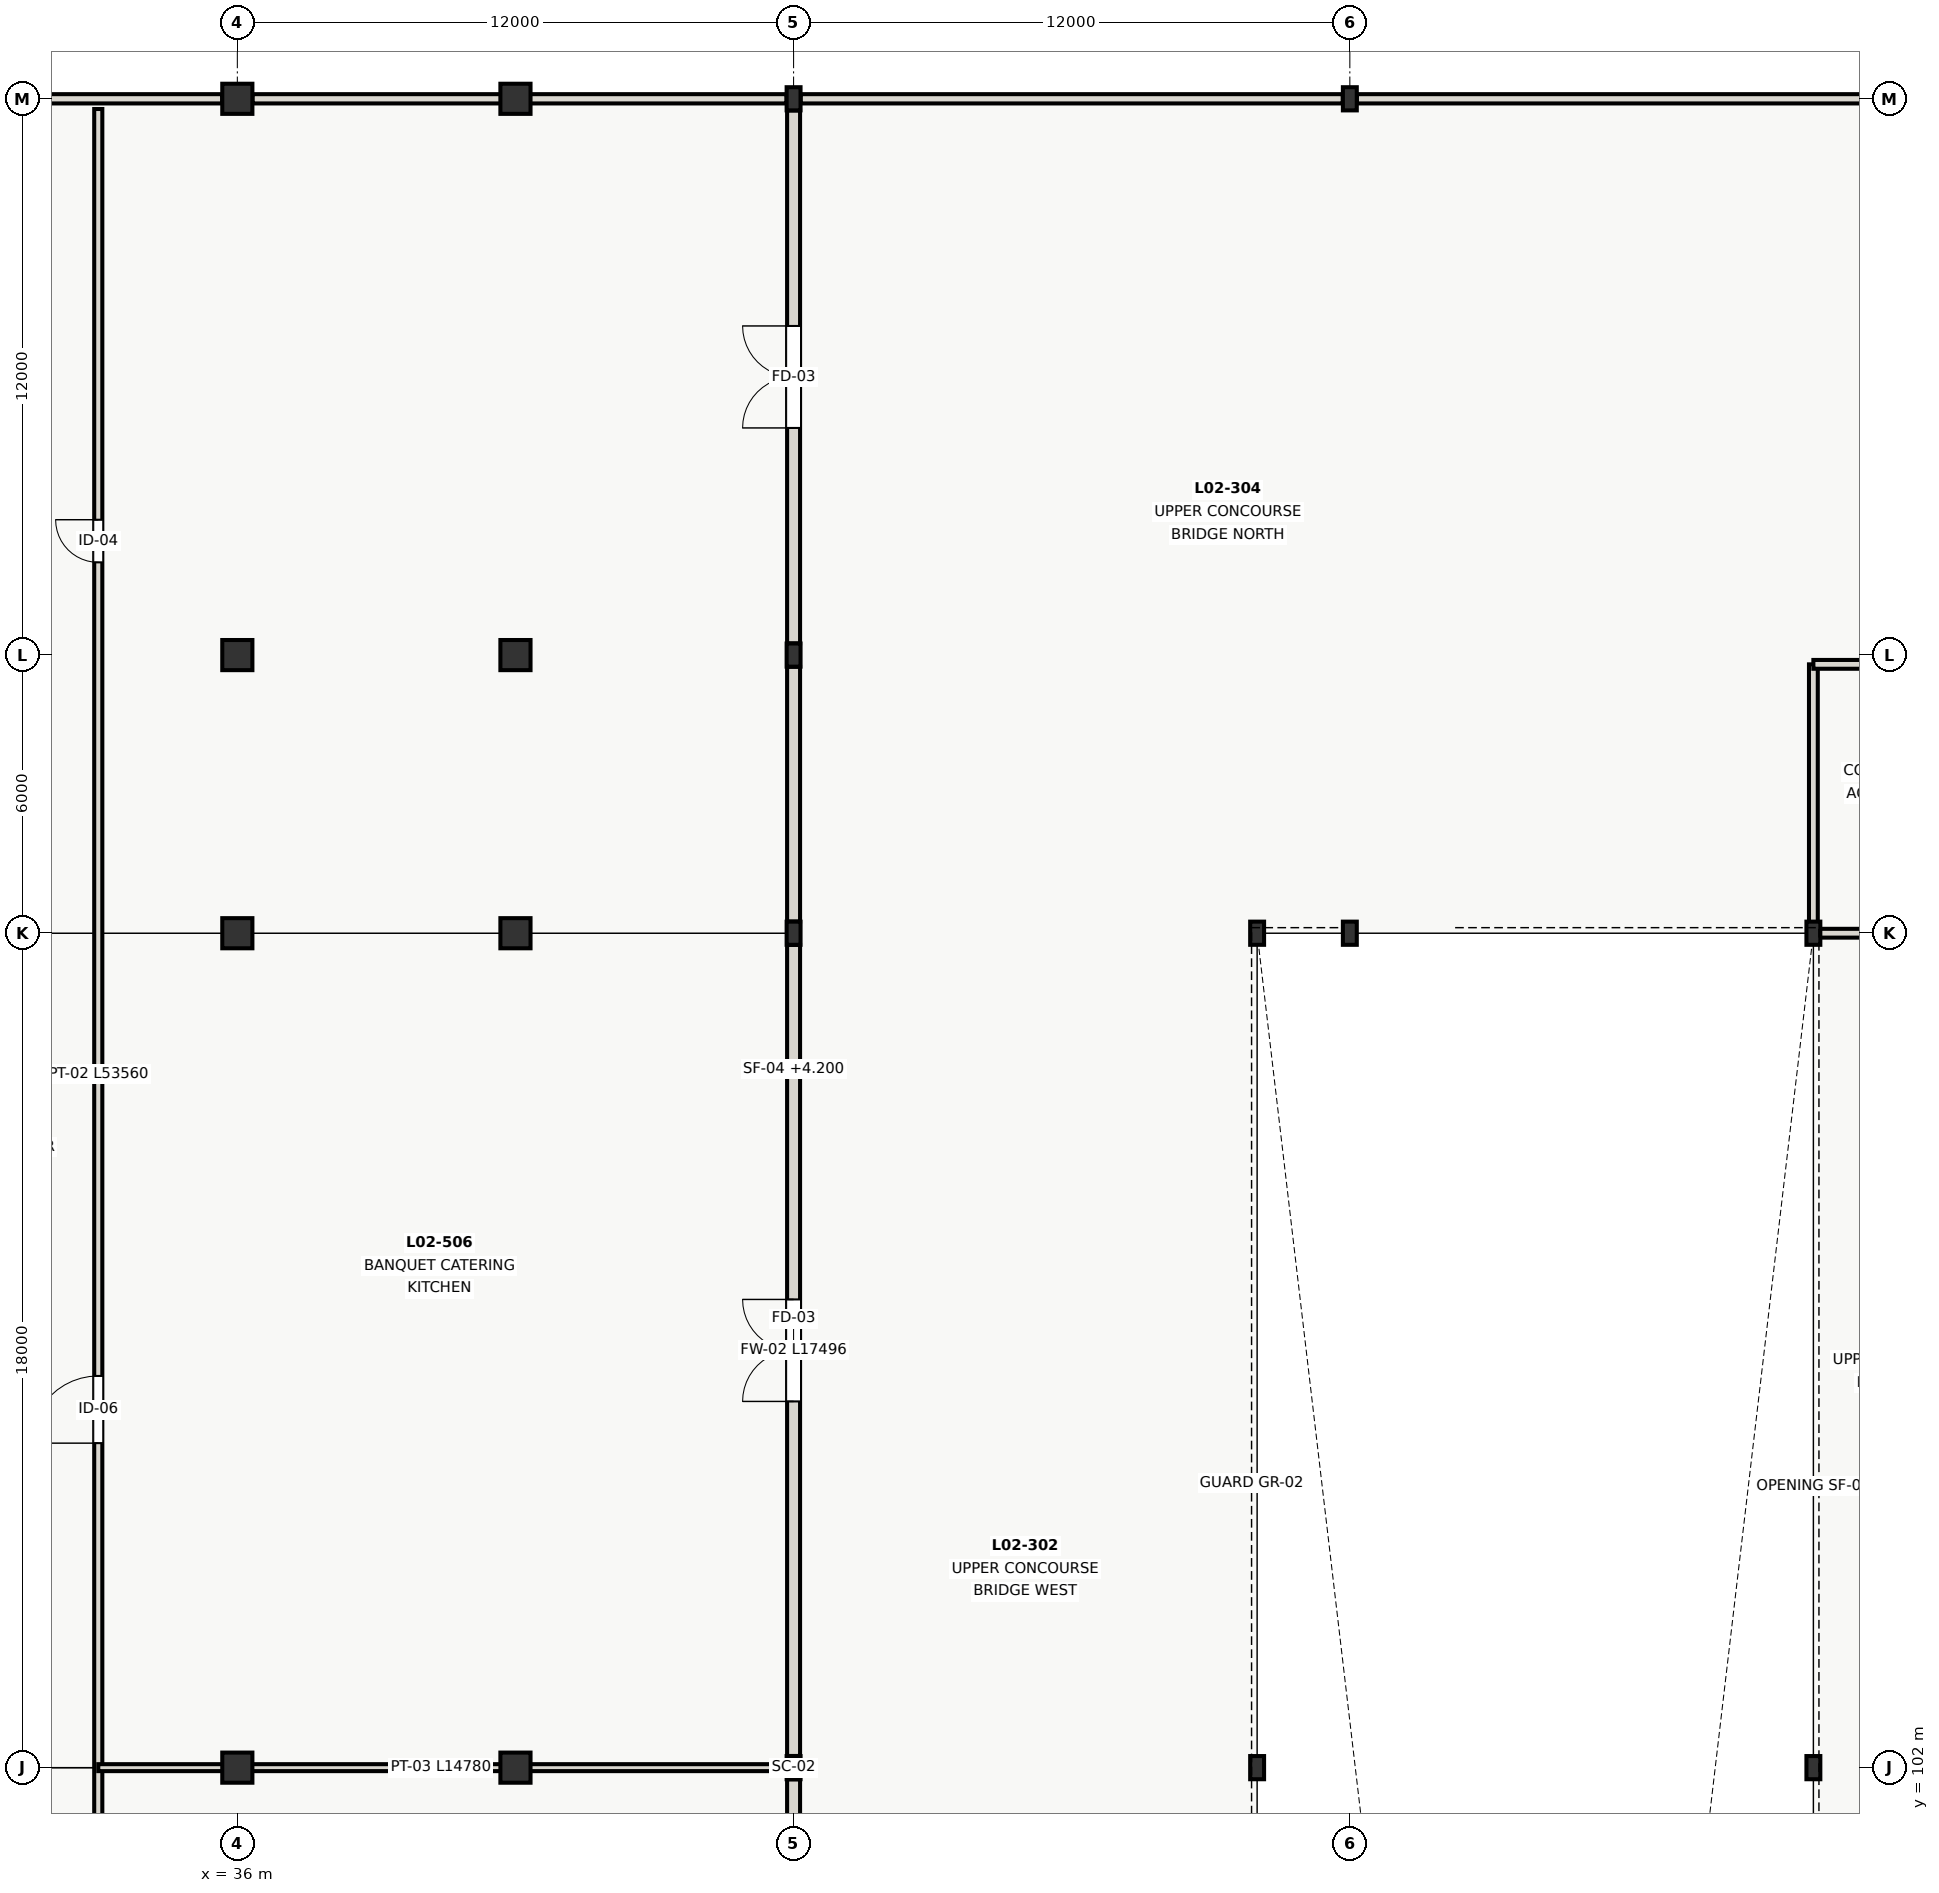
"""IFC4 building model, lengths in metres.
Left out: names, types, materials, properties, quantities, classifications, styles, units other than length and angle.
Written with IfcOpenShell. Run it as: python <this file> out.ifc"""

import sys

from ifc_helpers import new_model, si_unit, direction, frame, frame_2d, origin, origin_2d, place, context, subcontext, project, spatial, rectangle, i_section, extrude, element, fill, save


model = new_model("IFC4")
c1 = context("Model", 3, precision=1e-05, world=origin(), true_north=direction((0.0, 1.0)))
c2 = subcontext(c1, "Body", "Model", "MODEL_VIEW")
j1 = project(units=[si_unit("LENGTHUNIT", "METRE"), si_unit("PLANEANGLEUNIT", "RADIAN")], contexts=[c1])
p1 = place(None, origin())
s1 = spatial("IfcSite", under=j1, at=p1, CompositionType="ELEMENT")
p2 = place(p1, origin())
s2 = spatial("IfcBuilding", under=s1, at=p2, CompositionType="ELEMENT")
p3 = place(p2, frame((0.0, 0.0, 4.2)))
s3 = spatial("IfcBuildingStorey", under=s2, at=p3, CompositionType="ELEMENT", Elevation=4.2)
for number, where, z_axis, x_axis in (
    (1, (36.0, 102.0, 0.0), (0.0, 0.0, 1.0), (1.0, 0.0, 0.0)),
    (2, (42.0, 102.0, 0.0), (0.0, 0.0, 1.0), (1.0, 0.0, 0.0)),
):
    element("IfcColumn", number, at=place(p3, frame(where, z_axis=z_axis, x_axis=x_axis)), inside=s3, PredefinedType="COLUMN", context=c2, shape_type="SweptSolid", body=[
        extrude(rectangle(XDim=0.65, YDim=0.65, at=origin_2d()), origin(), (0.0, 0.0, 1.0), 4.2),
    ])
for number, where, z_axis, x_axis in (
    (3, (48.0, 102.0, 0.0), (0.0, 0.0, 1.0), (1.0, 0.0, 0.0)),
    (4, (58.0, 102.0, 0.0), (0.0, 0.0, 1.0), (1.0, 0.0, 0.0)),
    (5, (70.0, 102.0, 0.0), (0.0, 0.0, 1.0), (1.0, 0.0, 0.0)),
):
    element("IfcColumn", number, at=place(p3, frame(where, z_axis=z_axis, x_axis=x_axis)), inside=s3, PredefinedType="COLUMN", context=c2, shape_type="SweptSolid", body=[
        extrude(i_section(OverallWidth=0.3, OverallDepth=0.5, WebThickness=0.014, FlangeThickness=0.028, at=origin_2d()), origin(), (0.0, 0.0, 1.0), 4.2),
    ])
for number, where, z_axis, x_axis in (
    (6, (36.0, 120.0, 0.0), (0.0, 0.0, 1.0), (1.0, 0.0, 0.0)),
    (7, (42.0, 120.0, 0.0), (0.0, 0.0, 1.0), (1.0, 0.0, 0.0)),
):
    element("IfcColumn", number, at=place(p3, frame(where, z_axis=z_axis, x_axis=x_axis)), inside=s3, PredefinedType="COLUMN", context=c2, shape_type="SweptSolid", body=[
        extrude(rectangle(XDim=0.65, YDim=0.65, at=origin_2d()), origin(), (0.0, 0.0, 1.0), 4.2),
    ])
for number, where, z_axis, x_axis in (
    (8, (48.0, 120.0, 0.0), (0.0, 0.0, 1.0), (1.0, 0.0, 0.0)),
    (9, (58.0, 120.0, 0.0), (0.0, 0.0, 1.0), (1.0, 0.0, 0.0)),
    (10, (60.0, 120.0, 0.0), (0.0, 0.0, 1.0), (1.0, 0.0, 0.0)),
    (11, (70.0, 120.0, 0.0), (0.0, 0.0, 1.0), (1.0, 0.0, 0.0)),
):
    element("IfcColumn", number, at=place(p3, frame(where, z_axis=z_axis, x_axis=x_axis)), inside=s3, PredefinedType="COLUMN", context=c2, shape_type="SweptSolid", body=[
        extrude(i_section(OverallWidth=0.3, OverallDepth=0.5, WebThickness=0.014, FlangeThickness=0.028, at=origin_2d()), origin(), (0.0, 0.0, 1.0), 4.2),
    ])
for number, where, z_axis, x_axis in (
    (12, (36.0, 126.0, 0.0), (0.0, 0.0, 1.0), (1.0, 0.0, 0.0)),
    (13, (42.0, 126.0, 0.0), (0.0, 0.0, 1.0), (1.0, 0.0, 0.0)),
):
    element("IfcColumn", number, at=place(p3, frame(where, z_axis=z_axis, x_axis=x_axis)), inside=s3, PredefinedType="COLUMN", context=c2, shape_type="SweptSolid", body=[
        extrude(rectangle(XDim=0.65, YDim=0.65, at=origin_2d()), origin(), (0.0, 0.0, 1.0), 4.2),
    ])
p4 = place(p3, frame((48.0, 126.0, 0.0), z_axis=(0.0, 0.0, 1.0), x_axis=(1.0, 0.0, 0.0)))
e14 = element("IfcColumn", 14, at=p4, inside=s3, PredefinedType="COLUMN", context=c2, shape_type="SweptSolid", body=[
    extrude(i_section(OverallWidth=0.3, OverallDepth=0.5, WebThickness=0.014, FlangeThickness=0.028, at=origin_2d()), origin(), (0.0, 0.0, 1.0), 4.2),
])
for number, where, z_axis, x_axis in (
    (15, (36.0, 138.0, 0.0), (0.0, 0.0, 1.0), (1.0, 0.0, 0.0)),
    (16, (42.0, 138.0, 0.0), (0.0, 0.0, 1.0), (1.0, 0.0, 0.0)),
):
    element("IfcColumn", number, at=place(p3, frame(where, z_axis=z_axis, x_axis=x_axis)), inside=s3, PredefinedType="COLUMN", context=c2, shape_type="SweptSolid", body=[
        extrude(rectangle(XDim=0.65, YDim=0.65, at=origin_2d()), origin(), (0.0, 0.0, 1.0), 4.2),
    ])
for number, where, z_axis, x_axis in (
    (17, (48.0, 138.0, 0.0), (0.0, 0.0, 1.0), (1.0, 0.0, 0.0)),
    (18, (60.0, 138.0, 0.0), (0.0, 0.0, 1.0), (1.0, 0.0, 0.0)),
):
    element("IfcColumn", number, at=place(p3, frame(where, z_axis=z_axis, x_axis=x_axis)), inside=s3, PredefinedType="COLUMN", context=c2, shape_type="SweptSolid", body=[
        extrude(i_section(OverallWidth=0.3, OverallDepth=0.5, WebThickness=0.014, FlangeThickness=0.028, at=origin_2d()), origin(), (0.0, 0.0, 1.0), 4.2),
    ])
p5 = place(p3, frame((48.0, 84.252, 0.0), z_axis=(0.0, 0.0, 1.0), x_axis=(0.0, 1.0, 0.0)))
e19 = element("IfcWall", 19, at=p5, inside=s3, PredefinedType="SHEAR", context=c2, shape_type="SweptSolid", body=[
    extrude(rectangle(XDim=17.496, YDim=0.28, at=frame_2d((8.748, 0.0))), origin(), (0.0, 0.0, 1.0), 3.8),
])
p6 = place(p5, frame((7.648, 0.0, 0.0)))
e20 = element("IfcOpeningElement", 20, at=p6, cuts=e19, PredefinedType="OPENING", context=c2, shape_type="SweptSolid", body=[
    extrude(rectangle(XDim=2.2, YDim=2.3, at=frame_2d((1.1, 1.15))), frame((0.0, 0.15, 0.0), z_axis=(0.0, -1.0, 0.0), x_axis=(1.0, 0.0, 0.0)), (0.0, 0.0, 1.0), 0.3),
])
p7 = place(p3, frame((48.0, 102.252, 0.0), z_axis=(0.0, 0.0, 1.0), x_axis=(0.0, 1.0, 0.0)))
e21 = element("IfcWall", 21, at=p7, inside=s3, PredefinedType="SHEAR", context=c2, shape_type="SweptSolid", body=[
    extrude(rectangle(XDim=17.496, YDim=0.28, at=frame_2d((8.748, 0.0))), origin(), (0.0, 0.0, 1.0), 3.8),
])
p8 = place(p7, frame((7.648, 0.0, 0.0)))
e22 = element("IfcOpeningElement", 22, at=p8, cuts=e21, PredefinedType="OPENING", context=c2, shape_type="SweptSolid", body=[
    extrude(rectangle(XDim=2.2, YDim=2.3, at=frame_2d((1.1, 1.15))), frame((0.0, 0.15, 0.0), z_axis=(0.0, -1.0, 0.0), x_axis=(1.0, 0.0, 0.0)), (0.0, 0.0, 1.0), 0.3),
])
p9 = place(p3, frame((48.0, 120.252, 0.0), z_axis=(0.0, 0.0, 1.0), x_axis=(0.0, 1.0, 0.0)))
e23 = element("IfcWall", 23, at=p9, inside=s3, PredefinedType="SHEAR", context=c2, shape_type="SweptSolid", body=[
    extrude(rectangle(XDim=5.496, YDim=0.28, at=frame_2d((2.748, 0.0))), origin(), (0.0, 0.0, 1.0), 3.8),
])
p10 = place(p3, frame((48.0, 126.252, 0.0), z_axis=(0.0, 0.0, 1.0), x_axis=(0.0, 1.0, 0.0)))
e24 = element("IfcWall", 24, at=p10, inside=s3, PredefinedType="SHEAR", context=c2, shape_type="SweptSolid", body=[
    extrude(rectangle(XDim=11.496, YDim=0.28, at=frame_2d((5.748, 0.0))), origin(), (0.0, 0.0, 1.0), 3.8),
])
p11 = place(p10, frame((4.648, 0.0, 0.0)))
e25 = element("IfcOpeningElement", 25, at=p11, cuts=e24, PredefinedType="OPENING", context=c2, shape_type="SweptSolid", body=[
    extrude(rectangle(XDim=2.2, YDim=2.3, at=frame_2d((1.1, 1.15))), frame((0.0, 0.15, 0.0), z_axis=(0.0, -1.0, 0.0), x_axis=(1.0, 0.0, 0.0)), (0.0, 0.0, 1.0), 0.3),
])
p12 = place(p3, frame((24.327, 138.0, 0.0), z_axis=(0.0, 0.0, 1.0), x_axis=(1.0, 0.0, 0.0)))
e26 = element("IfcWall", 26, at=p12, inside=s3, PredefinedType="PARTITIONING", context=c2, shape_type="SweptSolid", body=[
    extrude(rectangle(XDim=11.346, YDim=0.2, at=frame_2d((5.673, 0.0))), origin(), (0.0, 0.0, 1.0), 3.56),
])
p13 = place(p3, frame((36.327, 138.0, 0.0), z_axis=(0.0, 0.0, 1.0), x_axis=(1.0, 0.0, 0.0)))
e27 = element("IfcWall", 27, at=p13, inside=s3, PredefinedType="PARTITIONING", context=c2, shape_type="SweptSolid", body=[
    extrude(rectangle(XDim=11.521, YDim=0.2, at=frame_2d((5.76, 0.0))), origin(), (0.0, 0.0, 1.0), 3.56),
])
p14 = place(p3, frame((48.152, 138.0, 0.0), z_axis=(0.0, 0.0, 1.0), x_axis=(1.0, 0.0, 0.0)))
e28 = element("IfcWall", 28, at=p14, inside=s3, PredefinedType="PARTITIONING", context=c2, shape_type="SweptSolid", body=[
    extrude(rectangle(XDim=11.696, YDim=0.2, at=frame_2d((5.848, 0.0))), origin(), (0.0, 0.0, 1.0), 3.56),
])
p15 = place(p3, frame((60.152, 138.0, 0.0), z_axis=(0.0, 0.0, 1.0), x_axis=(1.0, 0.0, 0.0)))
e29 = element("IfcWall", 29, at=p15, inside=s3, PredefinedType="PARTITIONING", context=c2, shape_type="SweptSolid", body=[
    extrude(rectangle(XDim=11.696, YDim=0.2, at=frame_2d((5.848, 0.0))), origin(), (0.0, 0.0, 1.0), 3.59),
])
p16 = place(p3, frame((33.0, 84.22, 0.0), z_axis=(0.0, 0.0, 1.0), x_axis=(0.0, 1.0, 0.0)))
e30 = element("IfcWall", 30, at=p16, inside=s3, PredefinedType="PARTITIONING", context=c2, shape_type="SweptSolid", body=[
    extrude(rectangle(XDim=53.56, YDim=0.175, at=frame_2d((26.78, 0.0))), origin(), (0.0, 0.0, 1.0), 3.72),
])
p17 = place(p16, frame((7.78, 0.0, 0.0)))
e31 = element("IfcOpeningElement", 31, at=p17, cuts=e30, PredefinedType="OPENING", context=c2, shape_type="SweptSolid", body=[
    extrude(rectangle(XDim=0.98, YDim=2.1, at=frame_2d((0.49, 1.05))), frame((0.0, 0.097, 0.0), z_axis=(0.0, -1.0, 0.0), x_axis=(1.0, 0.0, 0.0)), (0.0, 0.0, 1.0), 0.195),
])
p18 = place(p16, frame((24.78, 0.0, 0.0)))
e32 = element("IfcOpeningElement", 32, at=p18, cuts=e30, PredefinedType="OPENING", context=c2, shape_type="SweptSolid", body=[
    extrude(rectangle(XDim=1.45, YDim=2.15, at=frame_2d((0.725, 1.075))), frame((0.0, 0.097, 0.0), z_axis=(0.0, -1.0, 0.0), x_axis=(1.0, 0.0, 0.0)), (0.0, 0.0, 1.0), 0.195),
])
p19 = place(p16, frame((43.78, 0.0, 0.0)))
e33 = element("IfcOpeningElement", 33, at=p19, cuts=e30, PredefinedType="OPENING", context=c2, shape_type="SweptSolid", body=[
    extrude(rectangle(XDim=0.92, YDim=2.05, at=frame_2d((0.46, 1.025))), frame((0.0, 0.097, 0.0), z_axis=(0.0, -1.0, 0.0), x_axis=(1.0, 0.0, 0.0)), (0.0, 0.0, 1.0), 0.195),
])
p20 = place(p3, frame((33.0, 102.0, 0.0), z_axis=(0.0, 0.0, 1.0), x_axis=(1.0, 0.0, 0.0)))
e34 = element("IfcWall", 34, at=p20, inside=s3, PredefinedType="PARTITIONING", context=c2, shape_type="SweptSolid", body=[
    extrude(rectangle(XDim=14.78, YDim=0.15, at=frame_2d((7.39, 0.0))), origin(), (0.0, 0.0, 1.0), 3.4),
])
p21 = place(p3, frame((70.0, 120.0, 0.0), z_axis=(0.0, 0.0, 1.0), x_axis=(1.0, 0.0, 0.0)))
e35 = element("IfcWall", 35, at=p21, inside=s3, PredefinedType="PLUMBINGWALL", context=c2, shape_type="SweptSolid", body=[
    extrude(rectangle(XDim=7.7, YDim=0.19, at=frame_2d((3.85, 0.0))), origin(), (0.0, 0.0, 1.0), 3.37),
])
p22 = place(p21, frame((2.6, 0.0, 0.0)))
e36 = element("IfcOpeningElement", 36, at=p22, cuts=e35, PredefinedType="OPENING", context=c2, shape_type="SweptSolid", body=[
    extrude(rectangle(XDim=1.0, YDim=2.1, at=frame_2d((0.5, 1.05))), frame((0.0, 0.105, 0.0), z_axis=(0.0, -1.0, 0.0), x_axis=(1.0, 0.0, 0.0)), (0.0, 0.0, 1.0), 0.21),
])
p23 = place(p21, frame((5.4, 0.0, 0.0)))
e37 = element("IfcOpeningElement", 37, at=p23, cuts=e35, PredefinedType="OPENING", context=c2, shape_type="SweptSolid", body=[
    extrude(rectangle(XDim=0.9, YDim=2.05, at=frame_2d((0.45, 1.025))), frame((0.0, 0.105, 0.0), z_axis=(0.0, -1.0, 0.0), x_axis=(1.0, 0.0, 0.0)), (0.0, 0.0, 1.0), 0.21),
])
p24 = place(p3, frame((70.0, 120.0, 0.0), z_axis=(0.0, 0.0, 1.0), x_axis=(0.0, 1.0, 0.0)))
e38 = element("IfcWall", 38, at=p24, inside=s3, PredefinedType="PLUMBINGWALL", context=c2, shape_type="SweptSolid", body=[
    extrude(rectangle(XDim=5.8, YDim=0.19, at=frame_2d((2.9, 0.0))), origin(), (0.0, 0.0, 1.0), 3.72),
])
p25 = place(p3, frame((70.0, 125.8, 0.0), z_axis=(0.0, 0.0, 1.0), x_axis=(1.0, 0.0, 0.0)))
e39 = element("IfcWall", 39, at=p25, inside=s3, PredefinedType="PLUMBINGWALL", context=c2, shape_type="SweptSolid", body=[
    extrude(rectangle(XDim=4.6, YDim=0.19, at=frame_2d((2.3, 0.0))), origin(), (0.0, 0.0, 1.0), 3.72),
])
p26 = place(p8, origin())
e40 = element("IfcDoor", 40, at=p26, inside=s3, OperationType="DOUBLE_DOOR_SINGLE_SWING", PredefinedType="DOOR", context=c2, shape_type="SweptSolid", body=[
    extrude(rectangle(XDim=2.2, YDim=2.3, at=frame_2d((1.1, 1.15))), frame((0.0, 0.025, 0.0), z_axis=(0.0, -1.0, 0.0), x_axis=(1.0, 0.0, 0.0)), (0.0, 0.0, 1.0), 0.05),
])
fill(e22, e40)
p27 = place(p11, origin())
e41 = element("IfcDoor", 41, at=p27, inside=s3, OperationType="DOUBLE_DOOR_SINGLE_SWING", PredefinedType="DOOR", context=c2, shape_type="SweptSolid", body=[
    extrude(rectangle(XDim=2.2, YDim=2.3, at=frame_2d((1.1, 1.15))), frame((0.0, 0.025, 0.0), z_axis=(0.0, -1.0, 0.0), x_axis=(1.0, 0.0, 0.0)), (0.0, 0.0, 1.0), 0.05),
])
fill(e25, e41)
p28 = place(p18, origin())
e42 = element("IfcDoor", 42, at=p28, inside=s3, OperationType="SINGLE_SWING_LEFT", PredefinedType="DOOR", context=c2, shape_type="SweptSolid", body=[
    extrude(rectangle(XDim=1.45, YDim=2.15, at=frame_2d((0.725, 1.075))), frame((0.0, 0.025, 0.0), z_axis=(0.0, -1.0, 0.0), x_axis=(1.0, 0.0, 0.0)), (0.0, 0.0, 1.0), 0.05),
])
fill(e32, e42)
p29 = place(p19, origin())
e43 = element("IfcDoor", 43, at=p29, inside=s3, OperationType="SINGLE_SWING_RIGHT", PredefinedType="DOOR", context=c2, shape_type="SweptSolid", body=[
    extrude(rectangle(XDim=0.92, YDim=2.05, at=frame_2d((0.46, 1.025))), frame((0.0, 0.025, 0.0), z_axis=(0.0, -1.0, 0.0), x_axis=(1.0, 0.0, 0.0)), (0.0, 0.0, 1.0), 0.05),
])
fill(e33, e43)
save(model, sys.argv[1])
